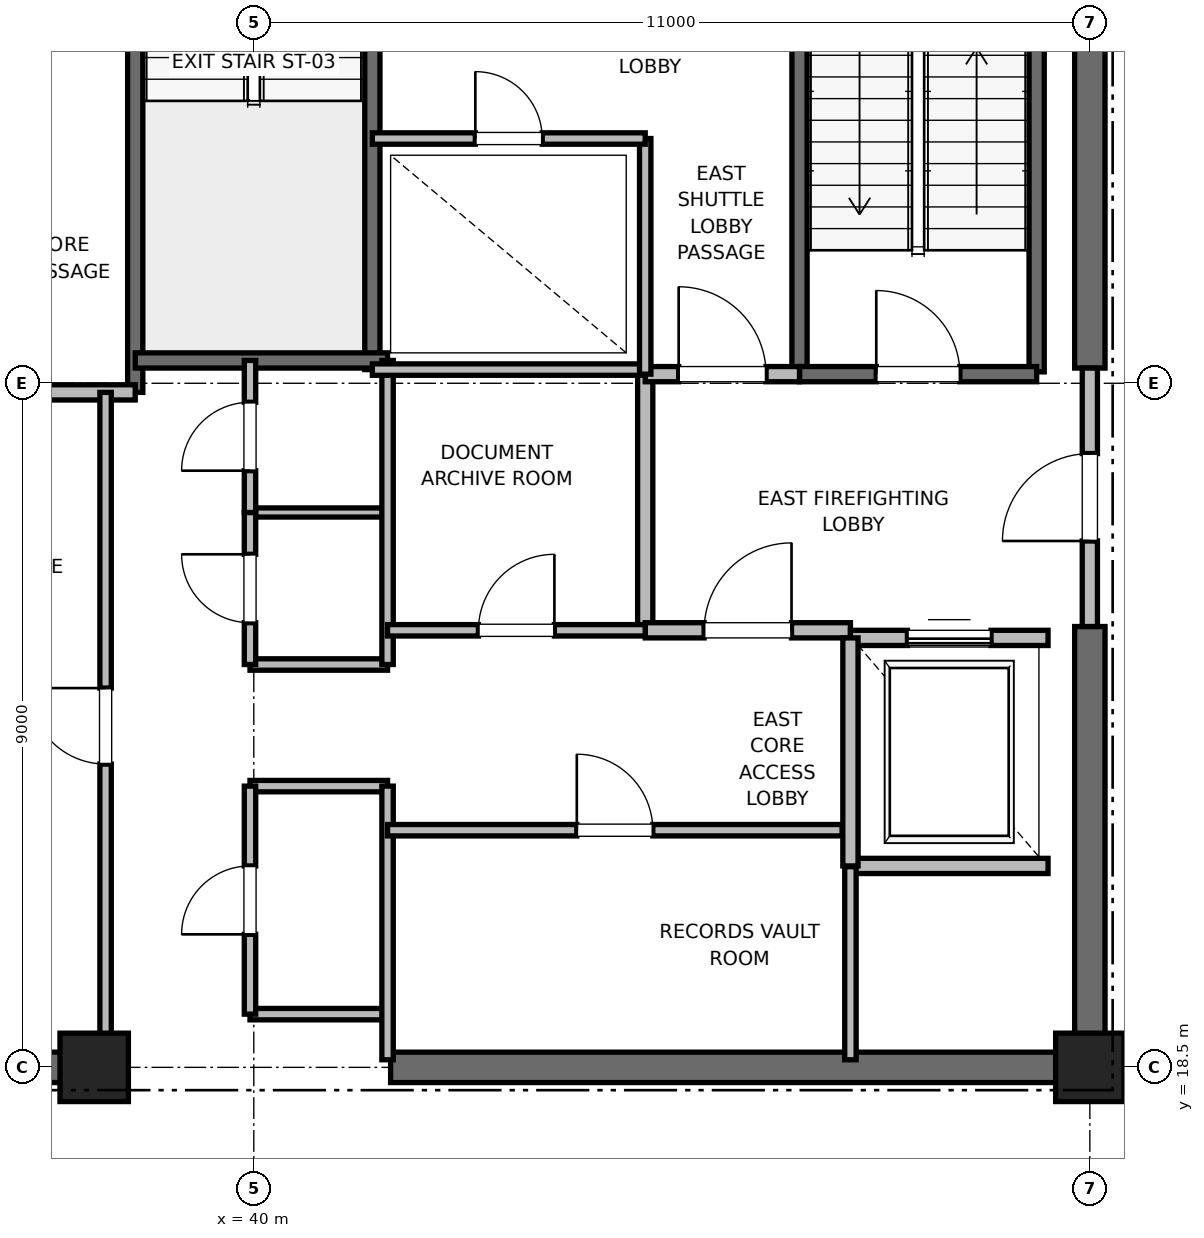
"""IFC4 building model, lengths in metres.
Left out: names, types, materials, properties, quantities, classifications, styles, units other than length and angle.
Written with IfcOpenShell. Run it as: python <this file> out.ifc"""

import sys

from ifc_helpers import new_model, si_unit, direction, frame, frame_2d, origin, origin_2d, place, context, subcontext, project, spatial, rectangle, extrude, element, fill, save


model = new_model("IFC4")
c1 = context("Model", 3, precision=1e-05, world=origin(), true_north=direction((0.0, 1.0)))
c2 = subcontext(c1, "Body", "Model", "MODEL_VIEW")
j1 = project(units=[si_unit("LENGTHUNIT", "METRE"), si_unit("PLANEANGLEUNIT", "RADIAN")], contexts=[c1])
p1 = place(None, origin())
s1 = spatial("IfcSite", under=j1, at=p1, CompositionType="ELEMENT")
p2 = place(p1, origin())
s2 = spatial("IfcBuilding", under=s1, at=p2, CompositionType="ELEMENT")
p3 = place(p2, frame((0.0, 0.0, 334.8)))
s3 = spatial("IfcBuildingStorey", under=s2, at=p3, CompositionType="ELEMENT", Elevation=334.8)
for number, where, z_axis, x_axis in (
    (1, (51.0, 18.5, 0.0), (0.0, 0.0, 1.0), (1.0, 0.0, 0.0)),
    (2, (37.9, 18.5, 0.0), (0.0, 0.0, 1.0), (1.0, 0.0, 0.0)),
):
    element("IfcColumn", number, at=place(p3, frame(where, z_axis=z_axis, x_axis=x_axis)), inside=s3, PredefinedType="PILASTER", context=c2, shape_type="SweptSolid", body=[
        extrude(rectangle(XDim=0.9, YDim=0.9, at=origin_2d()), origin(), (0.0, 0.0, 1.0), 4.0),
    ])
for number, where, z_axis, x_axis in (
    (3, (29.0, 18.5, 0.0), (0.0, 0.0, 1.0), (1.0, 0.0, 0.0)),
    (4, (41.8, 18.5, 0.0), (0.0, 0.0, 1.0), (1.0, 0.0, 0.0)),
):
    element("IfcWall", number, at=place(p3, frame(where, z_axis=z_axis, x_axis=x_axis)), inside=s3, PredefinedType="SHEAR", context=c2, shape_type="SweptSolid", body=[
        extrude(rectangle(XDim=9.2, YDim=0.4, at=frame_2d((4.6, 0.0))), origin(), (0.0, 0.0, 1.0), 3.785),
    ])
p4 = place(p3, frame((51.0, 18.5, 0.0), z_axis=(0.0, 0.0, 1.0), x_axis=(0.0, 1.0, 0.0)))
e5 = element("IfcWall", 5, at=p4, inside=s3, PredefinedType="SHEAR", context=c2, shape_type="SweptSolid", body=[
    extrude(rectangle(XDim=5.8, YDim=0.4, at=frame_2d((2.9, 0.0))), origin(), (0.0, 0.0, 1.0), 3.785),
])
p5 = place(p3, frame((51.0, 27.7, 0.0), z_axis=(0.0, 0.0, 1.0), x_axis=(0.0, 1.0, 0.0)))
e6 = element("IfcWall", 6, at=p5, inside=s3, PredefinedType="SHEAR", context=c2, shape_type="SweptSolid", body=[
    extrude(rectangle(XDim=8.8, YDim=0.4, at=frame_2d((4.4, 0.0))), origin(), (0.0, 0.0, 1.0), 3.785),
])
p6 = place(p3, frame((50.3, 27.65, 0.0), z_axis=(0.0, 0.0, 1.0), x_axis=(0.0, 1.0, 0.0)))
e7 = element("IfcWall", 7, at=p6, inside=s3, PredefinedType="SOLIDWALL", context=c2, shape_type="SweptSolid", body=[
    extrude(rectangle(XDim=8.15, YDim=0.2, at=frame_2d((4.075, 0.0))), origin(), (0.0, 0.0, 1.0), 3.785),
])
p7 = place(p3, frame((47.18, 27.62, 0.0), z_axis=(0.0, 0.0, 1.0), x_axis=(0.0, 1.0, 0.0)))
e8 = element("IfcWall", 8, at=p7, inside=s3, PredefinedType="SOLIDWALL", context=c2, shape_type="SweptSolid", body=[
    extrude(rectangle(XDim=8.18, YDim=0.2, at=frame_2d((4.09, 0.0))), origin(), (0.0, 0.0, 1.0), 3.785),
])
p8 = place(p3, frame((47.18, 27.62, 0.0), z_axis=(0.0, 0.0, 1.0), x_axis=(1.0, 0.0, 0.0)))
e9 = element("IfcWall", 9, at=p8, inside=s3, PredefinedType="SOLIDWALL", context=c2, shape_type="SweptSolid", body=[
    extrude(rectangle(XDim=3.12, YDim=0.2, at=frame_2d((1.56, 0.0))), origin(), (0.0, 0.0, 1.0), 3.785),
])
p9 = place(p8, frame((1.01, 0.0, 0.0)))
e10 = element("IfcOpeningElement", 10, at=p9, cuts=e9, PredefinedType="OPENING", context=c2, shape_type="SweptSolid", body=[
    extrude(rectangle(XDim=1.1, YDim=2.15, at=frame_2d((0.55, 1.075))), frame((0.0, 0.1, 0.0), z_axis=(0.0, -1.0, 0.0), x_axis=(1.0, 0.0, 0.0)), (0.0, 0.0, 1.0), 0.2),
])
p10 = place(p3, frame((38.44, 27.38, 0.0), z_axis=(0.0, 0.0, 1.0), x_axis=(0.0, 1.0, 0.0)))
e11 = element("IfcWall", 11, at=p10, inside=s3, PredefinedType="SOLIDWALL", context=c2, shape_type="SweptSolid", body=[
    extrude(rectangle(XDim=8.87, YDim=0.2, at=frame_2d((4.435, 0.0))), origin(), (0.0, 0.0, 1.0), 3.785),
])
p11 = place(p3, frame((41.56, 27.68, 0.0), z_axis=(0.0, 0.0, 1.0), x_axis=(0.0, 1.0, 0.0)))
e12 = element("IfcWall", 12, at=p11, inside=s3, PredefinedType="SOLIDWALL", context=c2, shape_type="SweptSolid", body=[
    extrude(rectangle(XDim=8.57, YDim=0.2, at=frame_2d((4.285, 0.0))), origin(), (0.0, 0.0, 1.0), 3.785),
])
p12 = place(p3, frame((38.44, 27.8, 0.0), z_axis=(0.0, 0.0, 1.0), x_axis=(1.0, 0.0, 0.0)))
e13 = element("IfcWall", 13, at=p12, inside=s3, PredefinedType="SOLIDWALL", context=c2, shape_type="SweptSolid", body=[
    extrude(rectangle(XDim=3.32, YDim=0.2, at=frame_2d((1.66, 0.0))), origin(), (0.0, 0.0, 1.0), 3.785),
])
p13 = place(p3, frame((32.82, 27.38, 0.0), z_axis=(0.0, 0.0, 1.0), x_axis=(1.0, 0.0, 0.0)))
e14 = element("IfcWall", 14, at=p13, inside=s3, PredefinedType="PARTITIONING", context=c2, shape_type="SweptSolid", body=[
    extrude(rectangle(XDim=5.62, YDim=0.2, at=frame_2d((2.81, 0.0))), origin(), (0.0, 0.0, 1.0), 3.785),
])
p14 = place(p3, frame((45.15, 24.25, 0.0), z_axis=(0.0, 0.0, 1.0), x_axis=(0.0, 1.0, 0.0)))
e15 = element("IfcWall", 15, at=p14, inside=s3, PredefinedType="PARTITIONING", context=c2, shape_type="SweptSolid", body=[
    extrude(rectangle(XDim=3.37, YDim=0.2, at=frame_2d((1.685, 0.0))), origin(), (0.0, 0.0, 1.0), 3.785),
])
p15 = place(p3, frame((45.15, 24.25, 0.0), z_axis=(0.0, 0.0, 1.0), x_axis=(1.0, 0.0, 0.0)))
e16 = element("IfcWall", 16, at=p15, inside=s3, PredefinedType="PARTITIONING", context=c2, shape_type="SweptSolid", body=[
    extrude(rectangle(XDim=2.7, YDim=0.2, at=frame_2d((1.35, 0.0))), origin(), (0.0, 0.0, 1.0), 3.785),
])
p16 = place(p15, frame((0.775, 0.0, 0.0)))
e17 = element("IfcOpeningElement", 17, at=p16, cuts=e16, PredefinedType="OPENING", context=c2, shape_type="SweptSolid", body=[
    extrude(rectangle(XDim=1.15, YDim=2.2, at=frame_2d((0.575, 1.1))), frame((0.0, 0.1, 0.0), z_axis=(0.0, -1.0, 0.0), x_axis=(1.0, 0.0, 0.0)), (0.0, 0.0, 1.0), 0.2),
])
p17 = place(p3, frame((45.15, 27.62, 0.0), z_axis=(0.0, 0.0, 1.0), x_axis=(1.0, 0.0, 0.0)))
e18 = element("IfcWall", 18, at=p17, inside=s3, PredefinedType="PARTITIONING", context=c2, shape_type="SweptSolid", body=[
    extrude(rectangle(XDim=2.03, YDim=0.2, at=frame_2d((1.015, 0.0))), origin(), (0.0, 0.0, 1.0), 3.785),
])
p18 = place(p17, frame((0.44, 0.0, 0.0)))
e19 = element("IfcOpeningElement", 19, at=p18, cuts=e18, PredefinedType="OPENING", context=c2, shape_type="SweptSolid", body=[
    extrude(rectangle(XDim=1.15, YDim=2.2, at=frame_2d((0.575, 1.1))), frame((0.0, 0.1, 0.0), z_axis=(0.0, -1.0, 0.0), x_axis=(1.0, 0.0, 0.0)), (0.0, 0.0, 1.0), 0.2),
])
p19 = place(p3, frame((51.0, 24.3, 0.0), z_axis=(0.0, 0.0, 1.0), x_axis=(0.0, 1.0, 0.0)))
e20 = element("IfcWall", 20, at=p19, inside=s3, PredefinedType="PARTITIONING", context=c2, shape_type="SweptSolid", body=[
    extrude(rectangle(XDim=3.4, YDim=0.2, at=frame_2d((1.7, 0.0))), origin(), (0.0, 0.0, 1.0), 2.865),
])
p20 = place(p19, frame((1.125, 0.0, 0.0)))
e21 = element("IfcOpeningElement", 21, at=p20, cuts=e20, PredefinedType="OPENING", context=c2, shape_type="SweptSolid", body=[
    extrude(rectangle(XDim=1.15, YDim=2.2, at=frame_2d((0.575, 1.1))), frame((0.0, 0.1, 0.0), z_axis=(0.0, -1.0, 0.0), x_axis=(1.0, 0.0, 0.0)), (0.0, 0.0, 1.0), 0.2),
])
p21 = place(p3, frame((47.85, 21.15, 0.0), z_axis=(0.0, 0.0, 1.0), x_axis=(1.0, 0.0, 0.0)))
e22 = element("IfcWall", 22, at=p21, inside=s3, PredefinedType="SOLIDWALL", context=c2, shape_type="SweptSolid", body=[
    extrude(rectangle(XDim=2.6, YDim=0.2, at=frame_2d((1.3, 0.0))), origin(), (0.0, 0.0, 1.0), 3.785),
])
p22 = place(p3, frame((50.45, 24.15, 0.0), z_axis=(0.0, 0.0, 1.0), x_axis=(-1.0, 0.0, 0.0)))
e23 = element("IfcWall", 23, at=p22, inside=s3, PredefinedType="SOLIDWALL", context=c2, shape_type="SweptSolid", body=[
    extrude(rectangle(XDim=2.6, YDim=0.2, at=frame_2d((1.3, 0.0))), origin(), (0.0, 0.0, 1.0), 2.865),
])
p23 = place(p22, frame((0.75, 0.0, 0.0)))
e24 = element("IfcOpeningElement", 24, at=p23, cuts=e23, PredefinedType="OPENING", context=c2, shape_type="SweptSolid", body=[
    extrude(rectangle(XDim=1.1, YDim=2.2, at=frame_2d((0.55, 1.1))), frame((0.0, 0.1, 0.0), z_axis=(0.0, -1.0, 0.0), x_axis=(1.0, 0.0, 0.0)), (0.0, 0.0, 1.0), 0.2),
])
p24 = place(p3, frame((47.85, 24.15, 0.0), z_axis=(0.0, 0.0, 1.0), x_axis=(0.0, -1.0, 0.0)))
e25 = element("IfcWall", 25, at=p24, inside=s3, PredefinedType="SOLIDWALL", context=c2, shape_type="SweptSolid", body=[
    extrude(rectangle(XDim=3.0, YDim=0.2, at=frame_2d((1.5, 0.0))), origin(), (0.0, 0.0, 1.0), 3.785),
])
for number, where, z_axis, x_axis in (
    (26, (39.95, 19.2, 0.0), (0.0, 0.0, 1.0), (1.0, 0.0, 0.0)),
    (27, (39.95, 22.2, 0.0), (0.0, 0.0, 1.0), (1.0, 0.0, 0.0)),
    (28, (39.95, 23.8, 0.0), (0.0, 0.0, 1.0), (1.0, 0.0, 0.0)),
):
    element("IfcWall", number, at=place(p3, frame(where, z_axis=z_axis, x_axis=x_axis)), inside=s3, PredefinedType="PARTITIONING", context=c2, shape_type="SweptSolid", body=[
        extrude(rectangle(XDim=1.81, YDim=0.15, at=frame_2d((0.905, 0.0))), origin(), (0.0, 0.0, 1.0), 2.85),
    ])
p25 = place(p3, frame((39.95, 25.8, 0.0), z_axis=(0.0, 0.0, 1.0), x_axis=(1.0, 0.0, 0.0)))
e29 = element("IfcWall", 29, at=p25, inside=s3, PredefinedType="PARTITIONING", context=c2, shape_type="SweptSolid", body=[
    extrude(rectangle(XDim=1.81, YDim=0.12, at=frame_2d((0.905, 0.0))), origin(), (0.0, 0.0, 1.0), 2.85),
])
p26 = place(p3, frame((41.76, 18.6, 0.0), z_axis=(0.0, 0.0, 1.0), x_axis=(0.0, 1.0, 0.0)))
e30 = element("IfcWall", 30, at=p26, inside=s3, PredefinedType="PARTITIONING", context=c2, shape_type="SweptSolid", body=[
    extrude(rectangle(XDim=3.6, YDim=0.15, at=frame_2d((1.8, 0.0))), origin(), (0.0, 0.0, 1.0), 2.85),
])
p27 = place(p3, frame((41.76, 23.8, 0.0), z_axis=(0.0, 0.0, 1.0), x_axis=(0.0, 1.0, 0.0)))
e31 = element("IfcWall", 31, at=p27, inside=s3, PredefinedType="PARTITIONING", context=c2, shape_type="SweptSolid", body=[
    extrude(rectangle(XDim=4.0, YDim=0.15, at=frame_2d((2.0, 0.0))), origin(), (0.0, 0.0, 1.0), 2.85),
])
p28 = place(p3, frame((39.95, 19.2, 0.0), z_axis=(0.0, 0.0, 1.0), x_axis=(0.0, 1.0, 0.0)))
e32 = element("IfcWall", 32, at=p28, inside=s3, PredefinedType="PARTITIONING", context=c2, shape_type="SweptSolid", body=[
    extrude(rectangle(XDim=3.0, YDim=0.15, at=frame_2d((1.5, 0.0))), origin(), (0.0, 0.0, 1.0), 2.85),
])
p29 = place(p28, frame((1.05, 0.0, 0.0)))
e33 = element("IfcOpeningElement", 33, at=p29, cuts=e32, PredefinedType="OPENING", context=c2, shape_type="SweptSolid", body=[
    extrude(rectangle(XDim=0.9, YDim=2.1, at=frame_2d((0.45, 1.05))), frame((0.0, 0.075, 0.0), z_axis=(0.0, -1.0, 0.0), x_axis=(1.0, 0.0, 0.0)), (0.0, 0.0, 1.0), 0.15),
])
p30 = place(p3, frame((39.95, 23.8, 0.0), z_axis=(0.0, 0.0, 1.0), x_axis=(0.0, 1.0, 0.0)))
e34 = element("IfcWall", 34, at=p30, inside=s3, PredefinedType="PARTITIONING", context=c2, shape_type="SweptSolid", body=[
    extrude(rectangle(XDim=2.0, YDim=0.15, at=frame_2d((1.0, 0.0))), origin(), (0.0, 0.0, 1.0), 2.85),
])
p31 = place(p30, frame((0.55, 0.0, 0.0)))
e35 = element("IfcOpeningElement", 35, at=p31, cuts=e34, PredefinedType="OPENING", context=c2, shape_type="SweptSolid", body=[
    extrude(rectangle(XDim=0.9, YDim=2.1, at=frame_2d((0.45, 1.05))), frame((0.0, 0.075, 0.0), z_axis=(0.0, -1.0, 0.0), x_axis=(1.0, 0.0, 0.0)), (0.0, 0.0, 1.0), 0.15),
])
p32 = place(p3, frame((39.95, 25.8, 0.0), z_axis=(0.0, 0.0, 1.0), x_axis=(0.0, 1.0, 0.0)))
e36 = element("IfcWall", 36, at=p32, inside=s3, PredefinedType="PARTITIONING", context=c2, shape_type="SweptSolid", body=[
    extrude(rectangle(XDim=2.0, YDim=0.15, at=frame_2d((1.0, 0.0))), origin(), (0.0, 0.0, 1.0), 2.85),
])
p33 = place(p32, frame((0.55, 0.0, 0.0)))
e37 = element("IfcOpeningElement", 37, at=p33, cuts=e36, PredefinedType="OPENING", context=c2, shape_type="SweptSolid", body=[
    extrude(rectangle(XDim=0.9, YDim=2.1, at=frame_2d((0.45, 1.05))), frame((0.0, 0.075, 0.0), z_axis=(0.0, -1.0, 0.0), x_axis=(1.0, 0.0, 0.0)), (0.0, 0.0, 1.0), 0.15),
])
p34 = place(p3, frame((38.05, 18.6, 0.0), z_axis=(0.0, 0.0, 1.0), x_axis=(0.0, 1.0, 0.0)))
e38 = element("IfcWall", 38, at=p34, inside=s3, PredefinedType="PARTITIONING", context=c2, shape_type="SweptSolid", body=[
    extrude(rectangle(XDim=8.78, YDim=0.15, at=frame_2d((4.39, 0.0))), origin(), (0.0, 0.0, 1.0), 2.85),
])
p35 = place(p34, frame((3.89, 0.0, 0.0)))
e39 = element("IfcOpeningElement", 39, at=p35, cuts=e38, PredefinedType="OPENING", context=c2, shape_type="SweptSolid", body=[
    extrude(rectangle(XDim=1.0, YDim=2.15, at=frame_2d((0.5, 1.075))), frame((0.0, 0.075, 0.0), z_axis=(0.0, -1.0, 0.0), x_axis=(1.0, 0.0, 0.0)), (0.0, 0.0, 1.0), 0.15),
])
p36 = place(p3, frame((41.56, 27.68, 0.0), z_axis=(0.0, 0.0, 1.0), x_axis=(1.0, 0.0, 0.0)))
e40 = element("IfcWall", 40, at=p36, inside=s3, PredefinedType="PARTITIONING", context=c2, shape_type="SweptSolid", body=[
    extrude(rectangle(XDim=3.59, YDim=0.15, at=frame_2d((1.795, 0.0))), origin(), (0.0, 0.0, 1.0), 2.85),
])
p37 = place(p3, frame((47.85, 18.6, 0.0), z_axis=(0.0, 0.0, 1.0), x_axis=(0.0, 1.0, 0.0)))
e41 = element("IfcWall", 41, at=p37, inside=s3, PredefinedType="PARTITIONING", context=c2, shape_type="SweptSolid", body=[
    extrude(rectangle(XDim=2.54, YDim=0.15, at=frame_2d((1.27, 0.0))), origin(), (0.0, 0.0, 1.0), 2.85),
])
p38 = place(p3, frame((41.76, 21.62, 0.0), z_axis=(0.0, 0.0, 1.0), x_axis=(1.0, 0.0, 0.0)))
e42 = element("IfcWall", 42, at=p38, inside=s3, PredefinedType="PARTITIONING", context=c2, shape_type="SweptSolid", body=[
    extrude(rectangle(XDim=5.98, YDim=0.15, at=frame_2d((2.99, 0.0))), origin(), (0.0, 0.0, 1.0), 2.85),
])
p39 = place(p38, frame((2.49, 0.0, 0.0)))
e43 = element("IfcOpeningElement", 43, at=p39, cuts=e42, PredefinedType="OPENING", context=c2, shape_type="SweptSolid", body=[
    extrude(rectangle(XDim=1.0, YDim=2.15, at=frame_2d((0.5, 1.075))), frame((0.0, 0.075, 0.0), z_axis=(0.0, -1.0, 0.0), x_axis=(1.0, 0.0, 0.0)), (0.0, 0.0, 1.0), 0.15),
])
p40 = place(p3, frame((41.76, 24.25, 0.0), z_axis=(0.0, 0.0, 1.0), x_axis=(1.0, 0.0, 0.0)))
e44 = element("IfcWall", 44, at=p40, inside=s3, PredefinedType="PARTITIONING", context=c2, shape_type="SweptSolid", body=[
    extrude(rectangle(XDim=3.39, YDim=0.15, at=frame_2d((1.695, 0.0))), origin(), (0.0, 0.0, 1.0), 2.85),
])
p41 = place(p40, frame((1.195, 0.0, 0.0)))
e45 = element("IfcOpeningElement", 45, at=p41, cuts=e44, PredefinedType="OPENING", context=c2, shape_type="SweptSolid", body=[
    extrude(rectangle(XDim=1.0, YDim=2.15, at=frame_2d((0.5, 1.075))), frame((0.0, 0.075, 0.0), z_axis=(0.0, -1.0, 0.0), x_axis=(1.0, 0.0, 0.0)), (0.0, 0.0, 1.0), 0.15),
])
p42 = place(p3, frame((45.15, 27.62, 0.0), z_axis=(0.0, 0.0, 1.0), x_axis=(0.0, 1.0, 0.0)))
e46 = element("IfcWall", 46, at=p42, inside=s3, PredefinedType="PARTITIONING", context=c2, shape_type="SweptSolid", body=[
    extrude(rectangle(XDim=3.1, YDim=0.15, at=frame_2d((1.55, 0.0))), origin(), (0.0, 0.0, 1.0), 2.85),
])
p43 = place(p3, frame((41.56, 30.72, 0.0), z_axis=(0.0, 0.0, 1.0), x_axis=(1.0, 0.0, 0.0)))
e47 = element("IfcWall", 47, at=p43, inside=s3, PredefinedType="PARTITIONING", context=c2, shape_type="SweptSolid", body=[
    extrude(rectangle(XDim=3.59, YDim=0.15, at=frame_2d((1.795, 0.0))), origin(), (0.0, 0.0, 1.0), 2.85),
])
p44 = place(p43, frame((1.355, 0.0, 0.0)))
e48 = element("IfcOpeningElement", 48, at=p44, cuts=e47, PredefinedType="OPENING", context=c2, shape_type="SweptSolid", body=[
    extrude(rectangle(XDim=0.88, YDim=2.1, at=frame_2d((0.44, 1.05))), frame((0.0, 0.075, 0.0), z_axis=(0.0, -1.0, 0.0), x_axis=(1.0, 0.0, 0.0)), (0.0, 0.0, 1.0), 0.15),
])
p45 = place(p9, origin())
e49 = element("IfcDoor", 49, at=p45, inside=s3, OperationType="SINGLE_SWING_LEFT", PredefinedType="DOOR", context=c2, shape_type="SweptSolid", body=[
    extrude(rectangle(XDim=1.1, YDim=2.15, at=frame_2d((0.55, 1.075))), frame((0.0, 0.025, 0.0), z_axis=(0.0, -1.0, 0.0), x_axis=(1.0, 0.0, 0.0)), (0.0, 0.0, 1.0), 0.05),
])
fill(e10, e49)
p46 = place(p16, origin())
e50 = element("IfcDoor", 50, at=p46, inside=s3, OperationType="SINGLE_SWING_RIGHT", PredefinedType="DOOR", context=c2, shape_type="SweptSolid", body=[
    extrude(rectangle(XDim=1.15, YDim=2.2, at=frame_2d((0.575, 1.1))), frame((0.0, 0.025, 0.0), z_axis=(0.0, -1.0, 0.0), x_axis=(1.0, 0.0, 0.0)), (0.0, 0.0, 1.0), 0.05),
])
fill(e17, e50)
p47 = place(p18, origin())
e51 = element("IfcDoor", 51, at=p47, inside=s3, OperationType="SINGLE_SWING_LEFT", PredefinedType="DOOR", context=c2, shape_type="SweptSolid", body=[
    extrude(rectangle(XDim=1.15, YDim=2.2, at=frame_2d((0.575, 1.1))), frame((0.0, 0.025, 0.0), z_axis=(0.0, -1.0, 0.0), x_axis=(1.0, 0.0, 0.0)), (0.0, 0.0, 1.0), 0.05),
])
fill(e19, e51)
p48 = place(p20, origin())
e52 = element("IfcDoor", 52, at=p48, inside=s3, OperationType="SINGLE_SWING_LEFT", PredefinedType="DOOR", context=c2, shape_type="SweptSolid", body=[
    extrude(rectangle(XDim=1.15, YDim=2.2, at=frame_2d((0.575, 1.1))), frame((0.0, 0.025, 0.0), z_axis=(0.0, -1.0, 0.0), x_axis=(1.0, 0.0, 0.0)), (0.0, 0.0, 1.0), 0.05),
])
fill(e21, e52)
p49 = place(p23, origin())
e53 = element("IfcDoor", 53, at=p49, inside=s3, OperationType="SLIDING_TO_RIGHT", PredefinedType="DOOR", context=c2, shape_type="SweptSolid", body=[
    extrude(rectangle(XDim=1.1, YDim=2.2, at=frame_2d((0.55, 1.1))), frame((0.0, 0.025, 0.0), z_axis=(0.0, -1.0, 0.0), x_axis=(1.0, 0.0, 0.0)), (0.0, 0.0, 1.0), 0.05),
])
fill(e24, e53)
p50 = place(p29, origin())
e54 = element("IfcDoor", 54, at=p50, inside=s3, OperationType="SINGLE_SWING_LEFT", PredefinedType="DOOR", context=c2, shape_type="SweptSolid", body=[
    extrude(rectangle(XDim=0.9, YDim=2.1, at=frame_2d((0.45, 1.05))), frame((0.0, 0.025, 0.0), z_axis=(0.0, -1.0, 0.0), x_axis=(1.0, 0.0, 0.0)), (0.0, 0.0, 1.0), 0.05),
])
fill(e33, e54)
p51 = place(p31, origin())
e55 = element("IfcDoor", 55, at=p51, inside=s3, OperationType="SINGLE_SWING_RIGHT", PredefinedType="DOOR", context=c2, shape_type="SweptSolid", body=[
    extrude(rectangle(XDim=0.9, YDim=2.1, at=frame_2d((0.45, 1.05))), frame((0.0, 0.025, 0.0), z_axis=(0.0, -1.0, 0.0), x_axis=(1.0, 0.0, 0.0)), (0.0, 0.0, 1.0), 0.05),
])
fill(e35, e55)
p52 = place(p33, origin())
e56 = element("IfcDoor", 56, at=p52, inside=s3, OperationType="SINGLE_SWING_LEFT", PredefinedType="DOOR", context=c2, shape_type="SweptSolid", body=[
    extrude(rectangle(XDim=0.9, YDim=2.1, at=frame_2d((0.45, 1.05))), frame((0.0, 0.025, 0.0), z_axis=(0.0, -1.0, 0.0), x_axis=(1.0, 0.0, 0.0)), (0.0, 0.0, 1.0), 0.05),
])
fill(e37, e56)
p53 = place(p35, origin())
e57 = element("IfcDoor", 57, at=p53, inside=s3, OperationType="SINGLE_SWING_RIGHT", PredefinedType="DOOR", context=c2, shape_type="SweptSolid", body=[
    extrude(rectangle(XDim=1.0, YDim=2.15, at=frame_2d((0.5, 1.075))), frame((0.0, 0.025, 0.0), z_axis=(0.0, -1.0, 0.0), x_axis=(1.0, 0.0, 0.0)), (0.0, 0.0, 1.0), 0.05),
])
fill(e39, e57)
p54 = place(p39, origin())
e58 = element("IfcDoor", 58, at=p54, inside=s3, OperationType="SINGLE_SWING_LEFT", PredefinedType="DOOR", context=c2, shape_type="SweptSolid", body=[
    extrude(rectangle(XDim=1.0, YDim=2.15, at=frame_2d((0.5, 1.075))), frame((0.0, 0.025, 0.0), z_axis=(0.0, -1.0, 0.0), x_axis=(1.0, 0.0, 0.0)), (0.0, 0.0, 1.0), 0.05),
])
fill(e43, e58)
p55 = place(p41, origin())
e59 = element("IfcDoor", 59, at=p55, inside=s3, OperationType="SINGLE_SWING_RIGHT", PredefinedType="DOOR", context=c2, shape_type="SweptSolid", body=[
    extrude(rectangle(XDim=1.0, YDim=2.15, at=frame_2d((0.5, 1.075))), frame((0.0, 0.025, 0.0), z_axis=(0.0, -1.0, 0.0), x_axis=(1.0, 0.0, 0.0)), (0.0, 0.0, 1.0), 0.05),
])
fill(e45, e59)
p56 = place(p44, origin())
e60 = element("IfcDoor", 60, at=p56, inside=s3, OperationType="SINGLE_SWING_LEFT", PredefinedType="DOOR", context=c2, shape_type="SweptSolid", body=[
    extrude(rectangle(XDim=0.88, YDim=2.1, at=frame_2d((0.44, 1.05))), frame((0.0, 0.025, 0.0), z_axis=(0.0, -1.0, 0.0), x_axis=(1.0, 0.0, 0.0)), (0.0, 0.0, 1.0), 0.05),
])
fill(e48, e60)
save(model, sys.argv[1])
